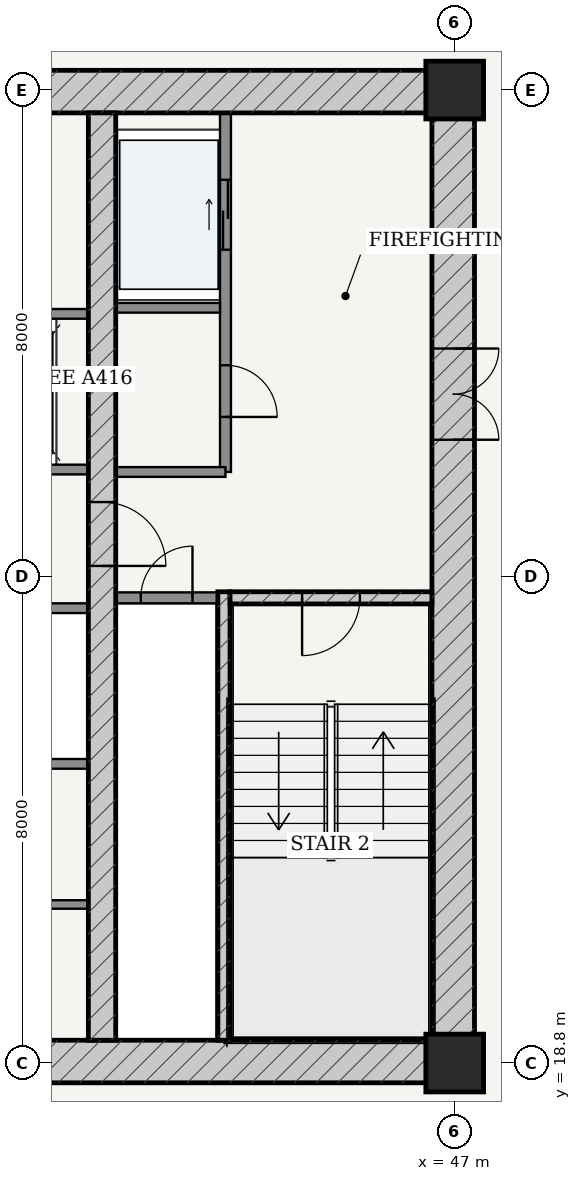
"""IFC4 building model, lengths in metres.
Left out: names, types, materials, properties, quantities, classifications, styles, units other than length and angle.
Written with IfcOpenShell. Run it as: python <this file> out.ifc"""

import sys

from ifc_helpers import new_model, si_unit, direction, frame, frame_2d, origin, origin_2d, place, context, subcontext, project, spatial, rectangle, extrude, source, transform, mapped, element, fill, save


model = new_model("IFC4")
c1 = context("Model", 3, precision=1e-05, world=origin(), true_north=direction((-0.2419218956, 0.970295726276)))
c2 = subcontext(c1, "Body", "Model", "MODEL_VIEW")
j1 = project(units=[si_unit("LENGTHUNIT", "METRE"), si_unit("PLANEANGLEUNIT", "RADIAN")], contexts=[c1])
p1 = place(None, origin())
s1 = spatial("IfcSite", under=j1, at=p1, CompositionType="ELEMENT")
p2 = place(p1, origin())
s2 = spatial("IfcBuilding", under=s1, at=p2, CompositionType="ELEMENT")
p3 = place(p2, frame((0.0, 0.0, 94.2)))
s3 = spatial("IfcBuildingStorey", under=s2, at=p3, CompositionType="ELEMENT", Elevation=94.2)
for number, where, z_axis, x_axis in (
    (1, (47.0, 18.8, 0.0), (0.0, 0.0, 1.0), (1.0, 0.0, 0.0)),
    (2, (47.0, 34.8, 0.0), (0.0, 0.0, 1.0), (1.0, 0.0, 0.0)),
):
    element("IfcColumn", number, at=place(p3, frame(where, z_axis=z_axis, x_axis=x_axis)), inside=s3, PredefinedType="COLUMN", context=c2, shape_type="SweptSolid", body=[
        extrude(rectangle(XDim=0.95, YDim=0.95, at=origin_2d()), origin(), (0.0, 0.0, 1.0), 3.6),
    ])
p4 = place(p3, frame((28.675, 18.825, 0.0), z_axis=(0.0, 0.0, 1.0), x_axis=(1.0, 0.0, 0.0)))
e3 = element("IfcWall", 3, at=p4, inside=s3, PredefinedType="SHEAR", context=c2, shape_type="SweptSolid", body=[
    extrude(rectangle(XDim=18.65, YDim=0.7, at=frame_2d((9.325, 0.0))), origin(), (0.0, 0.0, 1.0), 3.325),
])
p5 = place(p4, frame((8.9, 0.0, 0.0)))
e4 = element("IfcOpeningElement", 4, at=p5, cuts=e3, PredefinedType="OPENING", context=c2, shape_type="SweptSolid", body=[
    extrude(rectangle(XDim=0.85, YDim=2.1, at=frame_2d((0.425, 1.05))), frame((0.0, 0.36, 0.0), z_axis=(0.0, -1.0, 0.0), x_axis=(1.0, 0.0, 0.0)), (0.0, 0.0, 1.0), 0.72),
])
p6 = place(p3, frame((28.675, 34.775, 0.0), z_axis=(0.0, 0.0, 1.0), x_axis=(1.0, 0.0, 0.0)))
e5 = element("IfcWall", 5, at=p6, inside=s3, PredefinedType="SHEAR", context=c2, shape_type="SweptSolid", body=[
    extrude(rectangle(XDim=18.65, YDim=0.7, at=frame_2d((9.325, 0.0))), origin(), (0.0, 0.0, 1.0), 3.325),
])
p7 = place(p6, frame((8.9, 0.0, 0.0)))
e6 = element("IfcOpeningElement", 6, at=p7, cuts=e5, PredefinedType="OPENING", context=c2, shape_type="SweptSolid", body=[
    extrude(rectangle(XDim=0.85, YDim=2.1, at=frame_2d((0.425, 1.05))), frame((0.0, 0.36, 0.0), z_axis=(0.0, -1.0, 0.0), x_axis=(1.0, 0.0, 0.0)), (0.0, 0.0, 1.0), 0.72),
])
p8 = place(p3, frame((46.975, 19.175, 0.0), z_axis=(0.0, 0.0, 1.0), x_axis=(0.0, 1.0, 0.0)))
e7 = element("IfcWall", 7, at=p8, inside=s3, PredefinedType="SHEAR", context=c2, shape_type="SweptSolid", body=[
    extrude(rectangle(XDim=15.25, YDim=0.7, at=frame_2d((7.625, 0.0))), origin(), (0.0, 0.0, 1.0), 3.325),
])
p9 = place(p8, frame((9.875, 0.0, 0.0)))
e8 = element("IfcOpeningElement", 8, at=p9, cuts=e7, PredefinedType="OPENING", context=c2, shape_type="SweptSolid", body=[
    extrude(rectangle(XDim=1.5, YDim=2.2, at=frame_2d((0.75, 1.1))), frame((0.0, 0.36, 0.0), z_axis=(0.0, -1.0, 0.0), x_axis=(1.0, 0.0, 0.0)), (0.0, 0.0, 1.0), 0.72),
])
p10 = place(p3, frame((43.205, 19.175, 0.0), z_axis=(0.0, 0.0, 1.0), x_axis=(0.0, 1.0, 0.0)))
e9 = element("IfcWall", 9, at=p10, inside=s3, PredefinedType="SOLIDWALL", context=c2, shape_type="SweptSolid", body=[
    extrude(rectangle(XDim=7.375, YDim=0.2, at=frame_2d((3.688, 0.0))), origin(), (0.0, 0.0, 1.0), 3.325),
])
p11 = place(p3, frame((43.305, 26.45, 0.0), z_axis=(0.0, 0.0, 1.0), x_axis=(1.0, 0.0, 0.0)))
e10 = element("IfcWall", 10, at=p11, inside=s3, PredefinedType="SOLIDWALL", context=c2, shape_type="SweptSolid", body=[
    extrude(rectangle(XDim=3.32, YDim=0.2, at=frame_2d((1.66, 0.0))), origin(), (0.0, 0.0, 1.0), 3.325),
])
p12 = place(p11, frame((1.185, 0.0, 0.0)))
e11 = element("IfcOpeningElement", 11, at=p12, cuts=e10, PredefinedType="OPENING", context=c2, shape_type="SweptSolid", body=[
    extrude(rectangle(XDim=0.95, YDim=2.15, at=frame_2d((0.475, 1.075))), frame((0.0, 0.11, 0.0), z_axis=(0.0, -1.0, 0.0), x_axis=(1.0, 0.0, 0.0)), (0.0, 0.0, 1.0), 0.22),
])
p13 = place(p3, frame((41.2, 19.175, 0.0), z_axis=(0.0, 0.0, 1.0), x_axis=(0.0, 1.0, 0.0)))
e12 = element("IfcWall", 12, at=p13, inside=s3, PredefinedType="SHEAR", context=c2, shape_type="SweptSolid", body=[
    extrude(rectangle(XDim=15.25, YDim=0.45, at=frame_2d((7.625, 0.0))), origin(), (0.0, 0.0, 1.0), 3.325),
])
p14 = place(p13, frame((7.8, 0.0, 0.0)))
e13 = element("IfcOpeningElement", 13, at=p14, cuts=e12, PredefinedType="OPENING", context=c2, shape_type="SweptSolid", body=[
    extrude(rectangle(XDim=1.05, YDim=2.15, at=frame_2d((0.525, 1.075))), frame((0.0, 0.235, 0.0), z_axis=(0.0, -1.0, 0.0), x_axis=(1.0, 0.0, 0.0)), (0.0, 0.0, 1.0), 0.47),
])
p15 = place(p3, frame((41.425, 26.45, 0.0), z_axis=(0.0, 0.0, 1.0), x_axis=(1.0, 0.0, 0.0)))
e14 = element("IfcWall", 14, at=p15, inside=s3, PredefinedType="PARTITIONING", context=c2, shape_type="SweptSolid", body=[
    extrude(rectangle(XDim=1.675, YDim=0.18, at=frame_2d((0.837, 0.0))), origin(), (0.0, 0.0, 1.0), 3.325),
])
p16 = place(p15, frame((0.413, 0.0, 0.0)))
e15 = element("IfcOpeningElement", 15, at=p16, cuts=e14, PredefinedType="OPENING", context=c2, shape_type="SweptSolid", body=[
    extrude(rectangle(XDim=0.85, YDim=2.1, at=frame_2d((0.425, 1.05))), frame((0.0, 0.1, 0.0), z_axis=(0.0, -1.0, 0.0), x_axis=(1.0, 0.0, 0.0)), (0.0, 0.0, 1.0), 0.2),
])
p17 = place(p3, frame((43.23, 28.52, 0.0), z_axis=(0.0, 0.0, 1.0), x_axis=(0.0, 1.0, 0.0)))
e16 = element("IfcWall", 16, at=p17, inside=s3, PredefinedType="PARTITIONING", context=c2, shape_type="SweptSolid", body=[
    extrude(rectangle(XDim=5.905, YDim=0.18, at=frame_2d((2.953, 0.0))), origin(), (0.0, 0.0, 1.0), 3.325),
])
p18 = place(p17, frame((0.905, 0.0, 0.0)))
e17 = element("IfcOpeningElement", 17, at=p18, cuts=e16, PredefinedType="OPENING", context=c2, shape_type="SweptSolid", body=[
    extrude(rectangle(XDim=0.85, YDim=2.1, at=frame_2d((0.425, 1.05))), frame((0.0, 0.1, 0.0), z_axis=(0.0, -1.0, 0.0), x_axis=(1.0, 0.0, 0.0)), (0.0, 0.0, 1.0), 0.2),
])
p19 = place(p17, frame((3.655, 0.0, 0.0)))
e18 = element("IfcOpeningElement", 18, at=p19, cuts=e16, PredefinedType="OPENING", context=c2, shape_type="SweptSolid", body=[
    extrude(rectangle(XDim=1.15, YDim=2.2, at=frame_2d((0.575, 1.1))), frame((0.0, 0.1, 0.0), z_axis=(0.0, -1.0, 0.0), x_axis=(1.0, 0.0, 0.0)), (0.0, 0.0, 1.0), 0.2),
])
p20 = place(p3, frame((41.425, 31.22, 0.0), z_axis=(0.0, 0.0, 1.0), x_axis=(1.0, 0.0, 0.0)))
e19 = element("IfcWall", 19, at=p20, inside=s3, PredefinedType="PARTITIONING", context=c2, shape_type="SweptSolid", body=[
    extrude(rectangle(XDim=1.715, YDim=0.16, at=frame_2d((0.857, 0.0))), origin(), (0.0, 0.0, 1.0), 3.325),
])
p21 = place(p3, frame((41.425, 28.52, 0.0), z_axis=(0.0, 0.0, 1.0), x_axis=(1.0, 0.0, 0.0)))
e20 = element("IfcWall", 20, at=p21, inside=s3, PredefinedType="PARTITIONING", context=c2, shape_type="SweptSolid", body=[
    extrude(rectangle(XDim=1.805, YDim=0.16, at=frame_2d((0.902, 0.0))), origin(), (0.0, 0.0, 1.0), 3.325),
])
p22 = place(p3, frame((35.025, 28.56, 0.0), z_axis=(0.0, 0.0, 1.0), x_axis=(1.0, 0.0, 0.0)))
e21 = element("IfcWall", 21, at=p22, inside=s3, PredefinedType="PARTITIONING", context=c2, shape_type="SweptSolid", body=[
    extrude(rectangle(XDim=5.95, YDim=0.16, at=frame_2d((2.975, 0.0))), origin(), (0.0, 0.0, 1.0), 3.325),
])
p23 = place(p22, frame((0.76, 0.0, 0.0)))
e22 = element("IfcOpeningElement", 22, at=p23, cuts=e21, PredefinedType="OPENING", context=c2, shape_type="SweptSolid", body=[
    extrude(rectangle(XDim=1.1, YDim=2.2, at=frame_2d((0.55, 1.1))), frame((0.0, 0.09, 0.0), z_axis=(0.0, -1.0, 0.0), x_axis=(1.0, 0.0, 0.0)), (0.0, 0.0, 1.0), 0.18),
])
p24 = place(p22, frame((2.425, 0.0, 0.0)))
e23 = element("IfcOpeningElement", 23, at=p24, cuts=e21, PredefinedType="OPENING", context=c2, shape_type="SweptSolid", body=[
    extrude(rectangle(XDim=1.1, YDim=2.2, at=frame_2d((0.55, 1.1))), frame((0.0, 0.09, 0.0), z_axis=(0.0, -1.0, 0.0), x_axis=(1.0, 0.0, 0.0)), (0.0, 0.0, 1.0), 0.18),
])
p25 = place(p22, frame((4.09, 0.0, 0.0)))
e24 = element("IfcOpeningElement", 24, at=p25, cuts=e21, PredefinedType="OPENING", context=c2, shape_type="SweptSolid", body=[
    extrude(rectangle(XDim=1.1, YDim=2.2, at=frame_2d((0.55, 1.1))), frame((0.0, 0.09, 0.0), z_axis=(0.0, -1.0, 0.0), x_axis=(1.0, 0.0, 0.0)), (0.0, 0.0, 1.0), 0.18),
])
for number, where, z_axis, x_axis in (
    (25, (35.025, 31.12, 0.0), (0.0, 0.0, 1.0), (1.0, 0.0, 0.0)),
    (26, (35.025, 26.28, 0.0), (0.0, 0.0, 1.0), (1.0, 0.0, 0.0)),
    (27, (35.025, 23.72, 0.0), (0.0, 0.0, 1.0), (1.0, 0.0, 0.0)),
):
    element("IfcWall", number, at=place(p3, frame(where, z_axis=z_axis, x_axis=x_axis)), inside=s3, PredefinedType="PARTITIONING", context=c2, shape_type="SweptSolid", body=[
        extrude(rectangle(XDim=5.95, YDim=0.16, at=frame_2d((2.975, 0.0))), origin(), (0.0, 0.0, 1.0), 3.325),
    ])
p26 = place(p3, frame((35.025, 21.407, 0.0), z_axis=(0.0, 0.0, 1.0), x_axis=(1.0, 0.0, 0.0)))
e28 = element("IfcWall", 28, at=p26, inside=s3, PredefinedType="PARTITIONING", context=c2, shape_type="SweptSolid", body=[
    extrude(rectangle(XDim=5.95, YDim=0.14, at=frame_2d((2.975, 0.0))), origin(), (0.0, 0.0, 1.0), 3.325),
])
p27 = place(p26, frame((2.55, 0.0, 0.0)))
e29 = element("IfcOpeningElement", 29, at=p27, cuts=e28, PredefinedType="OPENING", context=c2, shape_type="SweptSolid", body=[
    extrude(rectangle(XDim=0.85, YDim=2.1, at=frame_2d((0.425, 1.05))), frame((0.0, 0.08, 0.0), z_axis=(0.0, -1.0, 0.0), x_axis=(1.0, 0.0, 0.0)), (0.0, 0.0, 1.0), 0.16),
])
m1 = source(origin(), c2, "Body", "SweptSolid", [
    extrude(rectangle(XDim=1.5, YDim=2.2, at=frame_2d((0.75, 1.1))), frame((0.0, 0.025, 0.0), z_axis=(0.0, -1.0, 0.0), x_axis=(1.0, 0.0, 0.0)), (0.0, 0.0, 1.0), 0.05),
])
p28 = place(p9, frame((1.5, 0.0, 0.0), z_axis=(0.0, 0.0, 1.0), x_axis=(-1.0, 0.0, 0.0)))
e30 = element("IfcDoor", 30, at=p28, inside=s3, OperationType="DOUBLE_DOOR_SINGLE_SWING", PredefinedType="DOOR", context=c2, shape_type="MappedRepresentation", body=[
    mapped(m1, transform((0.0, 0.0, 0.0), scale=1.0)),
])
fill(e8, e30)
m2 = source(origin(), c2, "Body", "SweptSolid", [
    extrude(rectangle(XDim=1.05, YDim=2.15, at=frame_2d((0.525, 1.075))), frame((0.0, 0.025, 0.0), z_axis=(0.0, -1.0, 0.0), x_axis=(1.0, 0.0, 0.0)), (0.0, 0.0, 1.0), 0.05),
])
p29 = place(p14, frame((1.05, 0.0, 0.0), z_axis=(0.0, 0.0, 1.0), x_axis=(-1.0, 0.0, 0.0)))
e31 = element("IfcDoor", 31, at=p29, inside=s3, OperationType="SINGLE_SWING_RIGHT", PredefinedType="DOOR", context=c2, shape_type="MappedRepresentation", body=[
    mapped(m2, transform((0.0, 0.0, 0.0), scale=1.0)),
])
fill(e13, e31)
m3 = source(origin(), c2, "Body", "SweptSolid", [
    extrude(rectangle(XDim=0.95, YDim=2.15, at=frame_2d((0.475, 1.075))), frame((0.0, 0.025, 0.0), z_axis=(0.0, -1.0, 0.0), x_axis=(1.0, 0.0, 0.0)), (0.0, 0.0, 1.0), 0.05),
])
p30 = place(p12, frame((0.95, 0.0, 0.0), z_axis=(0.0, 0.0, 1.0), x_axis=(-1.0, 0.0, 0.0)))
e32 = element("IfcDoor", 32, at=p30, inside=s3, OperationType="SINGLE_SWING_RIGHT", PredefinedType="DOOR", context=c2, shape_type="MappedRepresentation", body=[
    mapped(m3, transform((0.0, 0.0, 0.0), scale=1.0)),
])
fill(e11, e32)
m4 = source(origin(), c2, "Body", "SweptSolid", [
    extrude(rectangle(XDim=0.85, YDim=2.1, at=frame_2d((0.425, 1.05))), frame((0.0, 0.025, 0.0), z_axis=(0.0, -1.0, 0.0), x_axis=(1.0, 0.0, 0.0)), (0.0, 0.0, 1.0), 0.05),
])
p31 = place(p16, origin())
e33 = element("IfcDoor", 33, at=p31, inside=s3, OperationType="SINGLE_SWING_RIGHT", PredefinedType="DOOR", context=c2, shape_type="MappedRepresentation", body=[
    mapped(m4, transform((0.0, 0.0, 0.0), scale=1.0)),
])
fill(e15, e33)
p32 = place(p18, frame((0.85, 0.0, 0.0), z_axis=(0.0, 0.0, 1.0), x_axis=(-1.0, 0.0, 0.0)))
e34 = element("IfcDoor", 34, at=p32, inside=s3, OperationType="SINGLE_SWING_RIGHT", PredefinedType="DOOR", context=c2, shape_type="MappedRepresentation", body=[
    mapped(m4, transform((0.0, 0.0, 0.0), scale=1.0)),
])
fill(e17, e34)
m5 = source(origin(), c2, "Body", "SweptSolid", [
    extrude(rectangle(XDim=1.15, YDim=2.2, at=frame_2d((0.575, 1.1))), frame((0.0, 0.025, 0.0), z_axis=(0.0, -1.0, 0.0), x_axis=(1.0, 0.0, 0.0)), (0.0, 0.0, 1.0), 0.05),
])
p33 = place(p19, origin())
e35 = element("IfcDoor", 35, at=p33, inside=s3, OperationType="DOUBLE_DOOR_SLIDING", PredefinedType="DOOR", context=c2, shape_type="MappedRepresentation", body=[
    mapped(m5, transform((0.0, 0.0, 0.0), scale=1.0)),
])
fill(e18, e35)
save(model, sys.argv[1])
